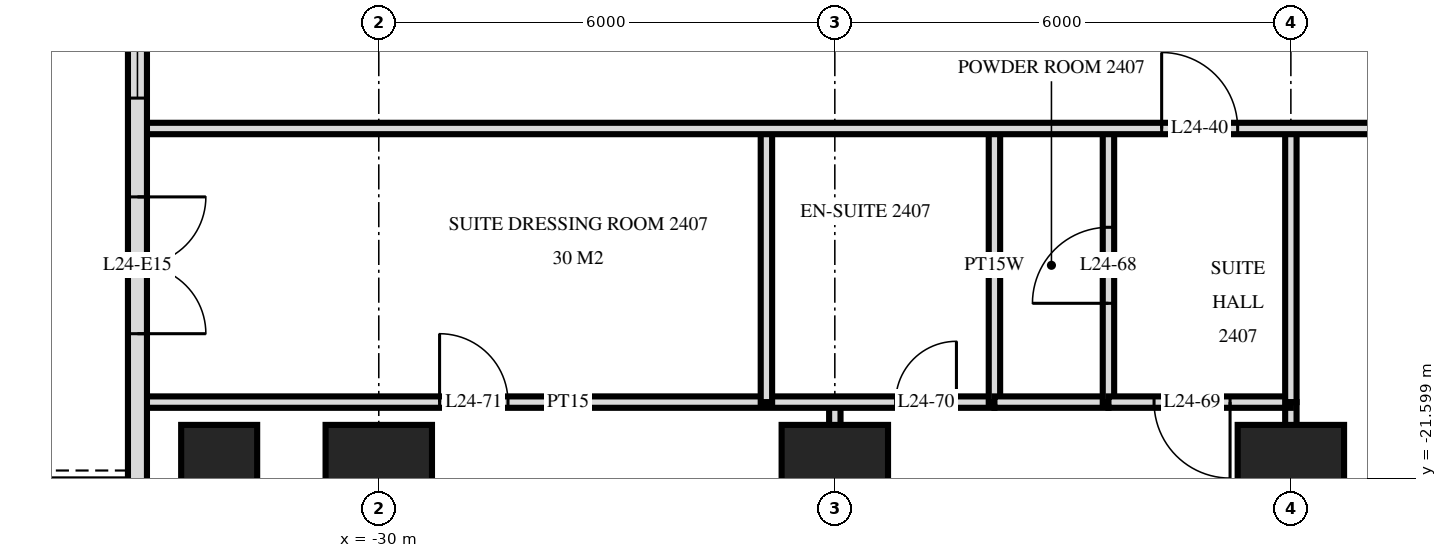
"""IFC4 building model, lengths in metres.
Left out: names, types, materials, properties, quantities, classifications, styles, units other than length and angle.
Written with IfcOpenShell. Run it as: python <this file> out.ifc"""

import sys

from ifc_helpers import new_model, si_unit, direction, frame, frame_2d, origin, origin_2d, place, context, subcontext, project, spatial, rectangle, extrude, element, fill, save


model = new_model("IFC4")
c1 = context("Model", 3, precision=1e-05, world=origin(), true_north=direction((0.0, 1.0)))
c2 = subcontext(c1, "Body", "Model", "MODEL_VIEW")
j1 = project(units=[si_unit("LENGTHUNIT", "METRE"), si_unit("PLANEANGLEUNIT", "RADIAN")], contexts=[c1])
p1 = place(None, origin())
s1 = spatial("IfcSite", under=j1, at=p1, CompositionType="ELEMENT")
p2 = place(p1, origin())
s2 = spatial("IfcBuilding", under=s1, at=p2, CompositionType="ELEMENT")
p3 = place(p2, frame((0.0, 0.0, 96.0)))
s3 = spatial("IfcBuildingStorey", under=s2, at=p3, CompositionType="ELEMENT", Elevation=96.0)
p4 = place(p3, frame((-32.1, -21.6, 0.0), z_axis=(0.0, 0.0, 1.0), x_axis=(0.0, 1.0, 0.0)))
e1 = element("IfcColumn", 1, at=p4, inside=s3, PredefinedType="COLUMN", context=c2, shape_type="SweptSolid", body=[
    extrude(rectangle(XDim=1.4, YDim=1.0, at=origin_2d()), origin(), (0.0, 0.0, 1.0), 3.6),
])
for number, where, z_axis, x_axis in (
    (2, (-30.0, -21.6, 0.0), (0.0, 0.0, 1.0), (1.0, 0.0, 0.0)),
    (3, (-24.0, -21.6, 0.0), (0.0, 0.0, 1.0), (1.0, 0.0, 0.0)),
    (4, (-18.0, -21.6, 0.0), (0.0, 0.0, 1.0), (1.0, 0.0, 0.0)),
):
    element("IfcColumn", number, at=place(p3, frame(where, z_axis=z_axis, x_axis=x_axis)), inside=s3, PredefinedType="COLUMN", context=c2, shape_type="SweptSolid", body=[
        extrude(rectangle(XDim=1.4, YDim=1.4, at=origin_2d()), origin(), (0.0, 0.0, 1.0), 3.6),
    ])
p5 = place(p3, frame((-33.175, -3.325, 0.0), z_axis=(0.0, 0.0, 1.0), x_axis=(0.0, -1.0, 0.0)))
e5 = element("IfcWall", 5, at=p5, inside=s3, PredefinedType="SOLIDWALL", context=c2, shape_type="SweptSolid", body=[
    extrude(rectangle(XDim=21.551, YDim=0.25, at=frame_2d((10.775, 0.0))), origin(), (0.0, 0.0, 1.0), 3.32),
])
p6 = place(p5, frame((7.025, 0.0, 0.0)))
e6 = element("IfcOpeningElement", 6, at=p6, cuts=e5, PredefinedType="OPENING", context=c2, shape_type="SweptSolid", body=[
    extrude(rectangle(XDim=1.8, YDim=2.4, at=frame_2d((0.9, 1.2))), frame((0.0, 0.135, 0.0), z_axis=(0.0, -1.0, 0.0), x_axis=(1.0, 0.0, 0.0)), (0.0, 0.0, 1.0), 0.27),
])
p7 = place(p5, frame((12.075, 0.0, 0.3)))
e7 = element("IfcOpeningElement", 7, at=p7, cuts=e5, PredefinedType="OPENING", context=c2, shape_type="SweptSolid", body=[
    extrude(rectangle(XDim=1.2, YDim=2.1, at=frame_2d((0.6, 1.05))), frame((0.0, 0.135, 0.0), z_axis=(0.0, -1.0, 0.0), x_axis=(1.0, 0.0, 0.0)), (0.0, 0.0, 1.0), 0.27),
])
p8 = place(p5, frame((14.575, 0.0, 0.0)))
e8 = element("IfcOpeningElement", 8, at=p8, cuts=e5, PredefinedType="OPENING", context=c2, shape_type="SweptSolid", body=[
    extrude(rectangle(XDim=1.8, YDim=2.4, at=frame_2d((0.9, 1.2))), frame((0.0, 0.135, 0.0), z_axis=(0.0, -1.0, 0.0), x_axis=(1.0, 0.0, 0.0)), (0.0, 0.0, 1.0), 0.27),
])
p9 = place(p5, frame((18.875, 0.0, 0.0)))
e9 = element("IfcOpeningElement", 9, at=p9, cuts=e5, PredefinedType="OPENING", context=c2, shape_type="SweptSolid", body=[
    extrude(rectangle(XDim=1.8, YDim=2.4, at=frame_2d((0.9, 1.2))), frame((0.0, 0.135, 0.0), z_axis=(0.0, -1.0, 0.0), x_axis=(1.0, 0.0, 0.0)), (0.0, 0.0, 1.0), 0.27),
])
p10 = place(p3, frame((-18.0, -20.6, 0.0), z_axis=(0.0, 0.0, 1.0), x_axis=(0.0, 1.0, 0.0)))
e10 = element("IfcWall", 10, at=p10, inside=s3, PredefinedType="PARTITIONING", context=c2, shape_type="SweptSolid", body=[
    extrude(rectangle(XDim=3.6, YDim=0.15, at=frame_2d((1.8, 0.0))), origin(), (0.0, 0.0, 1.0), 3.32),
])
p11 = place(p3, frame((-18.0, -29.22, 0.0), z_axis=(0.0, 0.0, 1.0), x_axis=(0.0, 1.0, 0.0)))
e11 = element("IfcWall", 11, at=p11, inside=s3, PredefinedType="PARTITIONING", context=c2, shape_type="SweptSolid", body=[
    extrude(rectangle(XDim=8.62, YDim=0.15, at=frame_2d((4.31, 0.0))), origin(), (0.0, 0.0, 1.0), 3.32),
])
p12 = place(p3, frame((-20.4, -20.6, 0.0), z_axis=(0.0, 0.0, 1.0), x_axis=(0.0, 1.0, 0.0)))
e12 = element("IfcWall", 12, at=p12, inside=s3, PredefinedType="PARTITIONING", context=c2, shape_type="SweptSolid", body=[
    extrude(rectangle(XDim=3.6, YDim=0.15, at=frame_2d((1.8, 0.0))), origin(), (0.0, 0.0, 1.0), 3.32),
])
p13 = place(p12, frame((1.3, 0.0, 0.0)))
e13 = element("IfcOpeningElement", 13, at=p13, cuts=e12, PredefinedType="OPENING", context=c2, shape_type="SweptSolid", body=[
    extrude(rectangle(XDim=1.0, YDim=2.1, at=frame_2d((0.5, 1.05))), frame((0.0, 0.085, 0.0), z_axis=(0.0, -1.0, 0.0), x_axis=(1.0, 0.0, 0.0)), (0.0, 0.0, 1.0), 0.17),
])
p14 = place(p3, frame((-21.9, -20.6, 0.0), z_axis=(0.0, 0.0, 1.0), x_axis=(0.0, 1.0, 0.0)))
e14 = element("IfcWall", 14, at=p14, inside=s3, PredefinedType="PLUMBINGWALL", context=c2, shape_type="SweptSolid", body=[
    extrude(rectangle(XDim=3.6, YDim=0.15, at=frame_2d((1.8, 0.0))), origin(), (0.0, 0.0, 1.0), 3.32),
])
p15 = place(p3, frame((-24.0, -29.22, 0.0), z_axis=(0.0, 0.0, 1.0), x_axis=(0.0, 1.0, 0.0)))
e15 = element("IfcWall", 15, at=p15, inside=s3, PredefinedType="PARTITIONING", context=c2, shape_type="SweptSolid", body=[
    extrude(rectangle(XDim=8.62, YDim=0.15, at=frame_2d((4.31, 0.0))), origin(), (0.0, 0.0, 1.0), 3.32),
])
p16 = place(p15, frame((3.79, 0.0, 0.0)))
e16 = element("IfcOpeningElement", 16, at=p16, cuts=e15, PredefinedType="OPENING", context=c2, shape_type="SweptSolid", body=[
    extrude(rectangle(XDim=0.9, YDim=2.1, at=frame_2d((0.45, 1.05))), frame((0.0, 0.085, 0.0), z_axis=(0.0, -1.0, 0.0), x_axis=(1.0, 0.0, 0.0)), (0.0, 0.0, 1.0), 0.17),
])
p17 = place(p3, frame((-24.9, -20.6, 0.0), z_axis=(0.0, 0.0, 1.0), x_axis=(0.0, 1.0, 0.0)))
e17 = element("IfcWall", 17, at=p17, inside=s3, PredefinedType="PARTITIONING", context=c2, shape_type="SweptSolid", body=[
    extrude(rectangle(XDim=3.6, YDim=0.15, at=frame_2d((1.8, 0.0))), origin(), (0.0, 0.0, 1.0), 3.32),
])
p18 = place(p3, frame((-20.4, -20.6, 0.0), z_axis=(0.0, 0.0, 1.0), x_axis=(1.0, 0.0, 0.0)))
e18 = element("IfcWall", 18, at=p18, inside=s3, PredefinedType="PARTITIONING", context=c2, shape_type="SweptSolid", body=[
    extrude(rectangle(XDim=2.4, YDim=0.15, at=frame_2d((1.2, 0.0))), origin(), (0.0, 0.0, 1.0), 3.32),
])
p19 = place(p18, frame((0.6, 0.0, 0.0)))
e19 = element("IfcOpeningElement", 19, at=p19, cuts=e18, PredefinedType="OPENING", context=c2, shape_type="SweptSolid", body=[
    extrude(rectangle(XDim=1.0, YDim=2.1, at=frame_2d((0.5, 1.05))), frame((0.0, 0.085, 0.0), z_axis=(0.0, -1.0, 0.0), x_axis=(1.0, 0.0, 0.0)), (0.0, 0.0, 1.0), 0.17),
])
p20 = place(p3, frame((-33.12, -20.6, 0.0), z_axis=(0.0, 0.0, 1.0), x_axis=(1.0, 0.0, 0.0)))
e20 = element("IfcWall", 20, at=p20, inside=s3, PredefinedType="PARTITIONING", context=c2, shape_type="SweptSolid", body=[
    extrude(rectangle(XDim=11.22, YDim=0.15, at=frame_2d((5.61, 0.0))), origin(), (0.0, 0.0, 1.0), 3.32),
])
p21 = place(p20, frame((9.92, 0.0, 0.0)))
e21 = element("IfcOpeningElement", 21, at=p21, cuts=e20, PredefinedType="OPENING", context=c2, shape_type="SweptSolid", body=[
    extrude(rectangle(XDim=0.8, YDim=2.1, at=frame_2d((0.4, 1.05))), frame((0.0, 0.085, 0.0), z_axis=(0.0, -1.0, 0.0), x_axis=(1.0, 0.0, 0.0)), (0.0, 0.0, 1.0), 0.17),
])
p22 = place(p20, frame((3.92, 0.0, 0.0)))
e22 = element("IfcOpeningElement", 22, at=p22, cuts=e20, PredefinedType="OPENING", context=c2, shape_type="SweptSolid", body=[
    extrude(rectangle(XDim=0.9, YDim=2.1, at=frame_2d((0.45, 1.05))), frame((0.0, 0.085, 0.0), z_axis=(0.0, -1.0, 0.0), x_axis=(1.0, 0.0, 0.0)), (0.0, 0.0, 1.0), 0.17),
])
p23 = place(p3, frame((-21.9, -20.6, 0.0), z_axis=(0.0, 0.0, 1.0), x_axis=(1.0, 0.0, 0.0)))
e23 = element("IfcWall", 23, at=p23, inside=s3, PredefinedType="PLUMBINGWALL", context=c2, shape_type="SweptSolid", body=[
    extrude(rectangle(XDim=1.5, YDim=0.15, at=frame_2d((0.75, 0.0))), origin(), (0.0, 0.0, 1.0), 3.32),
])
p24 = place(p3, frame((-33.12, -17.0, 0.0), z_axis=(0.0, 0.0, 1.0), x_axis=(1.0, 0.0, 0.0)))
e24 = element("IfcWall", 24, at=p24, inside=s3, PredefinedType="PARTITIONING", context=c2, shape_type="SweptSolid", body=[
    extrude(rectangle(XDim=66.24, YDim=0.15, at=frame_2d((33.12, 0.0))), origin(), (0.0, 0.0, 1.0), 3.32),
])
p25 = place(p24, frame((16.27, 0.0, 0.0)))
e25 = element("IfcOpeningElement", 25, at=p25, cuts=e24, PredefinedType="OPENING", context=c2, shape_type="SweptSolid", body=[
    extrude(rectangle(XDim=1.0, YDim=2.1, at=frame_2d((0.5, 1.05))), frame((0.0, 0.085, 0.0), z_axis=(0.0, -1.0, 0.0), x_axis=(1.0, 0.0, 0.0)), (0.0, 0.0, 1.0), 0.17),
])
p26 = place(p24, frame((22.97, 0.0, 0.0)))
e26 = element("IfcOpeningElement", 26, at=p26, cuts=e24, PredefinedType="OPENING", context=c2, shape_type="SweptSolid", body=[
    extrude(rectangle(XDim=1.0, YDim=2.1, at=frame_2d((0.5, 1.05))), frame((0.0, 0.085, 0.0), z_axis=(0.0, -1.0, 0.0), x_axis=(1.0, 0.0, 0.0)), (0.0, 0.0, 1.0), 0.17),
])
p27 = place(p24, frame((34.42, 0.0, 0.0)))
e27 = element("IfcOpeningElement", 27, at=p27, cuts=e24, PredefinedType="OPENING", context=c2, shape_type="SweptSolid", body=[
    extrude(rectangle(XDim=1.0, YDim=2.1, at=frame_2d((0.5, 1.05))), frame((0.0, 0.085, 0.0), z_axis=(0.0, -1.0, 0.0), x_axis=(1.0, 0.0, 0.0)), (0.0, 0.0, 1.0), 0.17),
])
p28 = place(p24, frame((39.22, 0.0, 0.0)))
e28 = element("IfcOpeningElement", 28, at=p28, cuts=e24, PredefinedType="OPENING", context=c2, shape_type="SweptSolid", body=[
    extrude(rectangle(XDim=1.0, YDim=2.1, at=frame_2d((0.5, 1.05))), frame((0.0, 0.085, 0.0), z_axis=(0.0, -1.0, 0.0), x_axis=(1.0, 0.0, 0.0)), (0.0, 0.0, 1.0), 0.17),
])
p29 = place(p24, frame((42.27, 0.0, 0.0)))
e29 = element("IfcOpeningElement", 29, at=p29, cuts=e24, PredefinedType="OPENING", context=c2, shape_type="SweptSolid", body=[
    extrude(rectangle(XDim=1.0, YDim=2.1, at=frame_2d((0.5, 1.05))), frame((0.0, 0.085, 0.0), z_axis=(0.0, -1.0, 0.0), x_axis=(1.0, 0.0, 0.0)), (0.0, 0.0, 1.0), 0.17),
])
p30 = place(p24, frame((45.82, 0.0, 0.0)))
e30 = element("IfcOpeningElement", 30, at=p30, cuts=e24, PredefinedType="OPENING", context=c2, shape_type="SweptSolid", body=[
    extrude(rectangle(XDim=1.0, YDim=2.1, at=frame_2d((0.5, 1.05))), frame((0.0, 0.085, 0.0), z_axis=(0.0, -1.0, 0.0), x_axis=(1.0, 0.0, 0.0)), (0.0, 0.0, 1.0), 0.17),
])
p31 = place(p24, frame((13.42, 0.0, 0.0)))
e31 = element("IfcOpeningElement", 31, at=p31, cuts=e24, PredefinedType="OPENING", context=c2, shape_type="SweptSolid", body=[
    extrude(rectangle(XDim=1.0, YDim=2.1, at=frame_2d((0.5, 1.05))), frame((0.0, 0.085, 0.0), z_axis=(0.0, -1.0, 0.0), x_axis=(1.0, 0.0, 0.0)), (0.0, 0.0, 1.0), 0.17),
])
p32 = place(p24, frame((54.82, 0.0, 0.0)))
e32 = element("IfcOpeningElement", 32, at=p32, cuts=e24, PredefinedType="OPENING", context=c2, shape_type="SweptSolid", body=[
    extrude(rectangle(XDim=1.0, YDim=2.1, at=frame_2d((0.5, 1.05))), frame((0.0, 0.085, 0.0), z_axis=(0.0, -1.0, 0.0), x_axis=(1.0, 0.0, 0.0)), (0.0, 0.0, 1.0), 0.17),
])
p33 = place(p7, origin())
e33 = element("IfcWindow", 33, at=p33, inside=s3, PartitioningType="SINGLE_PANEL", PredefinedType="WINDOW", context=c2, shape_type="SweptSolid", body=[
    extrude(rectangle(XDim=1.2, YDim=2.1, at=frame_2d((0.6, 1.05))), frame((0.0, 0.03, 0.0), z_axis=(0.0, -1.0, 0.0), x_axis=(1.0, 0.0, 0.0)), (0.0, 0.0, 1.0), 0.06),
])
fill(e7, e33)
p34 = place(p8, origin())
e34 = element("IfcDoor", 34, at=p34, inside=s3, OperationType="DOUBLE_DOOR_SINGLE_SWING", PredefinedType="DOOR", context=c2, shape_type="SweptSolid", body=[
    extrude(rectangle(XDim=1.8, YDim=2.4, at=frame_2d((0.9, 1.2))), frame((0.0, 0.025, 0.0), z_axis=(0.0, -1.0, 0.0), x_axis=(1.0, 0.0, 0.0)), (0.0, 0.0, 1.0), 0.05),
])
fill(e8, e34)
p35 = place(p31, origin())
e35 = element("IfcDoor", 35, at=p35, inside=s3, OperationType="SINGLE_SWING_RIGHT", PredefinedType="DOOR", context=c2, shape_type="SweptSolid", body=[
    extrude(rectangle(XDim=1.0, YDim=2.1, at=frame_2d((0.5, 1.05))), frame((0.0, 0.025, 0.0), z_axis=(0.0, -1.0, 0.0), x_axis=(1.0, 0.0, 0.0)), (0.0, 0.0, 1.0), 0.05),
])
fill(e31, e35)
p36 = place(p13, origin())
e36 = element("IfcDoor", 36, at=p36, inside=s3, OperationType="SINGLE_SWING_RIGHT", PredefinedType="DOOR", context=c2, shape_type="SweptSolid", body=[
    extrude(rectangle(XDim=1.0, YDim=2.1, at=frame_2d((0.5, 1.05))), frame((0.0, 0.025, 0.0), z_axis=(0.0, -1.0, 0.0), x_axis=(1.0, 0.0, 0.0)), (0.0, 0.0, 1.0), 0.05),
])
fill(e13, e36)
p37 = place(p19, frame((0.5, 0.0, 0.0), z_axis=(0.0, 0.0, 1.0), x_axis=(-1.0, 0.0, 0.0)))
e37 = element("IfcDoor", 37, at=p37, inside=s3, OperationType="SINGLE_SWING_RIGHT", PredefinedType="DOOR", context=c2, shape_type="SweptSolid", body=[
    extrude(rectangle(XDim=1.0, YDim=2.1, at=frame_2d((0.0, 1.05))), frame((0.0, -0.025, 0.0), z_axis=(0.0, 1.0, 0.0), x_axis=(-1.0, 0.0, 0.0)), (0.0, 0.0, 1.0), 0.05),
])
fill(e19, e37)
p38 = place(p21, origin())
e38 = element("IfcDoor", 38, at=p38, inside=s3, OperationType="SINGLE_SWING_LEFT", PredefinedType="DOOR", context=c2, shape_type="SweptSolid", body=[
    extrude(rectangle(XDim=0.8, YDim=2.1, at=frame_2d((0.4, 1.05))), frame((0.0, 0.025, 0.0), z_axis=(0.0, -1.0, 0.0), x_axis=(1.0, 0.0, 0.0)), (0.0, 0.0, 1.0), 0.05),
])
fill(e21, e38)
p39 = place(p22, origin())
e39 = element("IfcDoor", 39, at=p39, inside=s3, OperationType="SINGLE_SWING_RIGHT", PredefinedType="DOOR", context=c2, shape_type="SweptSolid", body=[
    extrude(rectangle(XDim=0.9, YDim=2.1, at=frame_2d((0.45, 1.05))), frame((0.0, 0.025, 0.0), z_axis=(0.0, -1.0, 0.0), x_axis=(1.0, 0.0, 0.0)), (0.0, 0.0, 1.0), 0.05),
])
fill(e22, e39)
save(model, sys.argv[1])
